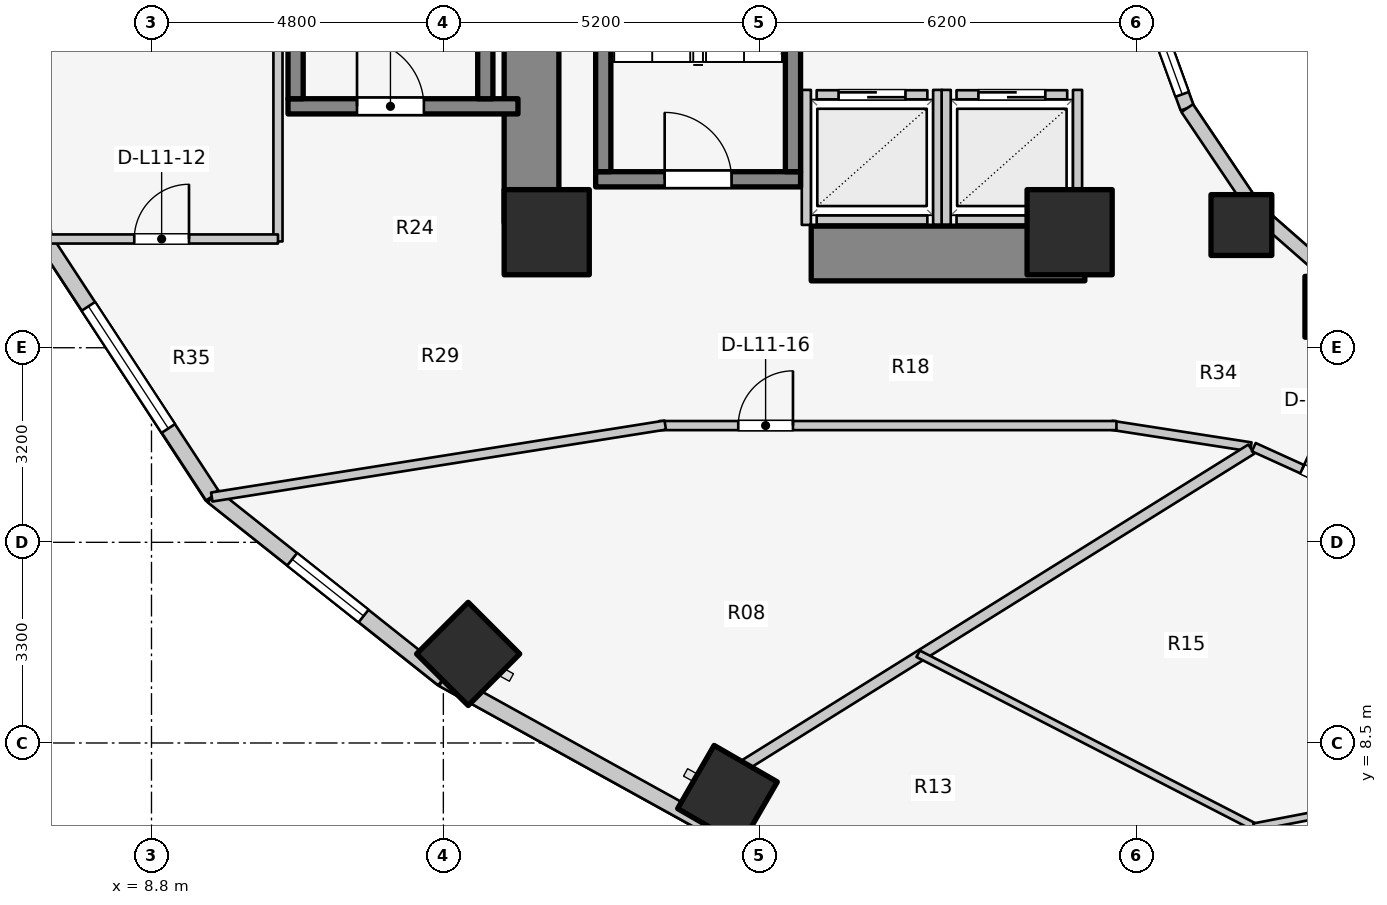
"""IFC4 building model, lengths in metres.
Left out: names, types, materials, properties, quantities, classifications, styles, units other than length and angle.
Written with IfcOpenShell. Run it as: python <this file> out.ifc"""

import sys

from ifc_helpers import new_model, si_unit, direction, frame, frame_2d, origin, origin_2d, place, context, subcontext, project, spatial, rectangle, extrude, element, fill, save


model = new_model("IFC4")
c1 = context("Model", 3, precision=1e-05, world=origin(), true_north=direction((0.0, 1.0)))
c2 = subcontext(c1, "Body", "Model", "MODEL_VIEW")
j1 = project(units=[si_unit("LENGTHUNIT", "METRE"), si_unit("PLANEANGLEUNIT", "RADIAN")], contexts=[c1])
p1 = place(None, origin())
s1 = spatial("IfcSite", under=j1, at=p1, CompositionType="ELEMENT")
p2 = place(p1, origin())
s2 = spatial("IfcBuilding", under=s1, at=p2, CompositionType="ELEMENT")
p3 = place(p2, frame((0.0, 0.0, 40.0)))
s3 = spatial("IfcBuildingStorey", under=s2, at=p3, CompositionType="ELEMENT", Elevation=40.0)
p4 = place(p3, frame((15.05, 17.05, 0.0), z_axis=(0.0, 0.0, 1.0), x_axis=(0.0, 1.0, 0.0)))
e1 = element("IfcWall", 1, at=p4, inside=s3, PredefinedType="SHEAR", context=c2, shape_type="SweptSolid", body=[
    extrude(rectangle(XDim=12.8, YDim=0.9, at=frame_2d((6.4, 0.0))), origin(), (0.0, 0.0, 1.0), 3.1),
])
p5 = place(p3, frame((19.65, 16.55, 0.0), z_axis=(0.0, 0.0, 1.0), x_axis=(1.0, 0.0, 0.0)))
e2 = element("IfcWall", 2, at=p5, inside=s3, PredefinedType="SHEAR", context=c2, shape_type="SweptSolid", body=[
    extrude(rectangle(XDim=4.5, YDim=0.9, at=frame_2d((2.25, 0.0))), origin(), (0.0, 0.0, 1.0), 3.1),
])
p6 = place(p3, frame((16.105, 17.77, 0.0), z_axis=(0.0, 0.0, 1.0), x_axis=(1.0, 0.0, 0.0)))
e3 = element("IfcWall", 3, at=p6, inside=s3, PredefinedType="SOLIDWALL", context=c2, shape_type="SweptSolid", body=[
    extrude(rectangle(XDim=3.37, YDim=0.25, at=frame_2d((1.685, 0.0))), origin(), (0.0, 0.0, 1.0), 3.1),
])
p7 = place(p6, frame((1.135, 0.0, 0.0)))
e4 = element("IfcOpeningElement", 4, at=p7, cuts=e3, PredefinedType="OPENING", context=c2, shape_type="SweptSolid", body=[
    extrude(rectangle(XDim=1.1, YDim=2.1, at=frame_2d((0.55, 1.05))), frame((0.0, 0.135, 0.0), z_axis=(0.0, -1.0, 0.0), x_axis=(1.0, 0.0, 0.0)), (0.0, 0.0, 1.0), 0.27),
])
for number, where, z_axis, x_axis in (
    (5, (16.23, 17.895, 0.0), (0.0, 0.0, 1.0), (0.0, 1.0, 0.0)),
    (6, (19.35, 17.895, 0.0), (0.0, 0.0, 1.0), (0.0, 1.0, 0.0)),
):
    element("IfcWall", number, at=place(p3, frame(where, z_axis=z_axis, x_axis=x_axis)), inside=s3, PredefinedType="SOLIDWALL", context=c2, shape_type="SweptSolid", body=[
        extrude(rectangle(XDim=7.81, YDim=0.25, at=frame_2d((3.905, 0.0))), origin(), (0.0, 0.0, 1.0), 3.1),
    ])
p8 = place(p3, frame((11.045, 18.97, 0.0), z_axis=(0.0, 0.0, 1.0), x_axis=(1.0, 0.0, 0.0)))
e7 = element("IfcWall", 7, at=p8, inside=s3, PredefinedType="SOLIDWALL", context=c2, shape_type="SweptSolid", body=[
    extrude(rectangle(XDim=3.782, YDim=0.25, at=frame_2d((1.891, 0.0))), origin(), (0.0, 0.0, 1.0), 3.1),
])
p9 = place(p8, frame((1.135, 0.0, 0.0)))
e8 = element("IfcOpeningElement", 8, at=p9, cuts=e7, PredefinedType="OPENING", context=c2, shape_type="SweptSolid", body=[
    extrude(rectangle(XDim=1.1, YDim=2.1, at=frame_2d((0.55, 1.05))), frame((0.0, 0.135, 0.0), z_axis=(0.0, -1.0, 0.0), x_axis=(1.0, 0.0, 0.0)), (0.0, 0.0, 1.0), 0.27),
])
for number, where, z_axis, x_axis in (
    (9, (11.17, 19.095, 0.0), (0.0, 0.0, 1.0), (0.0, 1.0, 0.0)),
    (10, (14.29, 19.095, 0.0), (0.0, 0.0, 1.0), (0.0, 1.0, 0.0)),
):
    element("IfcWall", number, at=place(p3, frame(where, z_axis=z_axis, x_axis=x_axis)), inside=s3, PredefinedType="SOLIDWALL", context=c2, shape_type="SweptSolid", body=[
        extrude(rectangle(XDim=7.81, YDim=0.25, at=frame_2d((3.905, 0.0))), origin(), (0.0, 0.0, 1.0), 3.1),
    ])
for number, where, z_axis, x_axis in (
    (11, (15.3, 16.9, 0.0), (0.0, 0.0, 1.0), (1.0, 0.0, 0.0)),
    (12, (23.9, 16.9, 0.0), (0.0, 0.0, 1.0), (1.0, 0.0, 0.0)),
):
    element("IfcColumn", number, at=place(p3, frame(where, z_axis=z_axis, x_axis=x_axis)), inside=s3, PredefinedType="COLUMN", context=c2, shape_type="SweptSolid", body=[
        extrude(rectangle(XDim=1.4, YDim=1.4, at=origin_2d()), origin(), (0.0, 0.0, 1.0), 3.1),
    ])
p10 = place(p3, frame((26.725, 17.018, 0.0), z_axis=(0.0, 0.0, 1.0), x_axis=(1.0, 0.0, 0.0)))
e13 = element("IfcColumn", 13, at=p10, inside=s3, PredefinedType="COLUMN", context=c2, shape_type="SweptSolid", body=[
    extrude(rectangle(XDim=1.0, YDim=1.0, at=origin_2d()), origin(), (0.0, 0.0, 1.0), 3.1),
])
p11 = place(p3, frame((14.008, 9.965, 0.0), z_axis=(0.0, 0.0, 1.0), x_axis=(-0.707106781187, -0.707106781187, 0.0)))
e14 = element("IfcColumn", 14, at=p11, inside=s3, PredefinedType="COLUMN", context=c2, shape_type="SweptSolid", body=[
    extrude(rectangle(XDim=1.2, YDim=1.2, at=origin_2d()), origin(), (0.0, 0.0, 1.0), 3.1),
])
p12 = place(p3, frame((28.27, 15.673, 0.0), z_axis=(0.0, 0.0, 1.0), x_axis=(1.0, 0.0, 0.0)))
e15 = element("IfcColumn", 15, at=p12, inside=s3, PredefinedType="COLUMN", context=c2, shape_type="SweptSolid", body=[
    extrude(rectangle(XDim=1.0, YDim=1.0, at=origin_2d()), origin(), (0.0, 0.0, 1.0), 3.1),
])
p13 = place(p3, frame((18.273, 7.641, 0.0), z_axis=(0.0, 0.0, 1.0), x_axis=(-0.5, -0.866025403784, 0.0)))
e16 = element("IfcColumn", 16, at=p13, inside=s3, PredefinedType="COLUMN", context=c2, shape_type="SweptSolid", body=[
    extrude(rectangle(XDim=1.2, YDim=1.2, at=origin_2d()), origin(), (0.0, 0.0, 1.0), 3.1),
])
p14 = place(p3, frame((25.123, 20.898, 0.0), z_axis=(0.0, 0.0, 1.0), x_axis=(0.341423187295, -0.93990968033, 0.0)))
e17 = element("IfcWall", 17, at=p14, inside=s3, PredefinedType="STANDARD", context=c2, shape_type="SweptSolid", body=[
    extrude(rectangle(XDim=2.084, YDim=0.23, at=frame_2d((1.042, 0.0))), origin(), (0.0, 0.0, 1.0), 2.84),
])
p15 = place(p14, frame((0.242, 0.0, 0.85)))
e18 = element("IfcOpeningElement", 18, at=p15, cuts=e17, PredefinedType="OPENING", context=c2, shape_type="SweptSolid", body=[
    extrude(rectangle(XDim=1.6, YDim=1.65, at=frame_2d((0.8, 0.825))), frame((0.0, 0.125, 0.0), z_axis=(0.0, -1.0, 0.0), x_axis=(1.0, 0.0, 0.0)), (0.0, 0.0, 1.0), 0.25),
])
p16 = place(p3, frame((25.834, 18.94, 0.0), z_axis=(0.0, 0.0, 1.0), x_axis=(0.558197800898, -0.829707909492, 0.0)))
e19 = element("IfcWall", 19, at=p16, inside=s3, PredefinedType="STANDARD", context=c2, shape_type="SweptSolid", body=[
    extrude(rectangle(XDim=2.027, YDim=0.23, at=frame_2d((1.013, 0.0))), origin(), (0.0, 0.0, 1.0), 2.16),
])
p17 = place(p3, frame((26.965, 17.258, 0.0), z_axis=(0.0, 0.0, 1.0), x_axis=(0.752576694707, -0.658504607869, 0.0)))
e20 = element("IfcWall", 20, at=p17, inside=s3, PredefinedType="STANDARD", context=c2, shape_type="SweptSolid", body=[
    extrude(rectangle(XDim=1.959, YDim=0.23, at=frame_2d((0.98, 0.0))), origin(), (0.0, 0.0, 1.0), 2.16),
])
p18 = place(p3, frame((7.033, 16.795, 0.0), z_axis=(0.0, 0.0, 1.0), x_axis=(0.547702757047, -0.836672988642, 0.0)))
e21 = element("IfcWall", 21, at=p18, inside=s3, PredefinedType="STANDARD", context=c2, shape_type="SweptSolid", body=[
    extrude(rectangle(XDim=5.062, YDim=0.26, at=frame_2d((2.531, 0.0))), origin(), (0.0, 0.0, 1.0), 2.85),
])
p19 = place(p18, frame((1.331, 0.0, 0.75)))
e22 = element("IfcOpeningElement", 22, at=p19, cuts=e21, PredefinedType="OPENING", context=c2, shape_type="SweptSolid", body=[
    extrude(rectangle(XDim=2.4, YDim=1.7, at=frame_2d((1.2, 0.85))), frame((0.0, 0.14, 0.0), z_axis=(0.0, -1.0, 0.0), x_axis=(1.0, 0.0, 0.0)), (0.0, 0.0, 1.0), 0.28),
])
p20 = place(p3, frame((9.806, 12.559, 0.0), z_axis=(0.0, 0.0, 1.0), x_axis=(0.783123133379, -0.621866672179, 0.0)))
e23 = element("IfcWall", 23, at=p20, inside=s3, PredefinedType="STANDARD", context=c2, shape_type="SweptSolid", body=[
    extrude(rectangle(XDim=4.839, YDim=0.26, at=frame_2d((2.419, 0.0))), origin(), (0.0, 0.0, 1.0), 2.85),
])
p21 = place(p20, frame((1.669, 0.0, 0.75)))
e24 = element("IfcOpeningElement", 24, at=p21, cuts=e23, PredefinedType="OPENING", context=c2, shape_type="SweptSolid", body=[
    extrude(rectangle(XDim=1.5, YDim=1.6, at=frame_2d((0.75, 0.8))), frame((0.0, 0.14, 0.0), z_axis=(0.0, -1.0, 0.0), x_axis=(1.0, 0.0, 0.0)), (0.0, 0.0, 1.0), 0.28),
])
p22 = place(p3, frame((13.595, 9.55, 0.0), z_axis=(0.0, 0.0, 1.0), x_axis=(0.875137303239, -0.483874674352, 0.0)))
e25 = element("IfcWall", 25, at=p22, inside=s3, PredefinedType="STANDARD", context=c2, shape_type="SweptSolid", body=[
    extrude(rectangle(XDim=4.985, YDim=0.26, at=frame_2d((2.493, 0.0))), origin(), (0.0, 0.0, 1.0), 2.85),
])
p23 = place(p3, frame((17.958, 7.138, 0.0), z_axis=(0.0, 0.0, 1.0), x_axis=(0.958843593522, -0.283934786811, 0.0)))
e26 = element("IfcWall", 26, at=p23, inside=s3, PredefinedType="STANDARD", context=c2, shape_type="SweptSolid", body=[
    extrude(rectangle(XDim=5.955, YDim=0.26, at=frame_2d((2.978, 0.0))), origin(), (0.0, 0.0, 1.0), 2.85),
])
p24 = place(p23, frame((1.778, 0.0, 0.75)))
e27 = element("IfcOpeningElement", 27, at=p24, cuts=e26, PredefinedType="OPENING", context=c2, shape_type="SweptSolid", body=[
    extrude(rectangle(XDim=2.4, YDim=1.7, at=frame_2d((1.2, 0.85))), frame((0.0, 0.14, 0.0), z_axis=(0.0, -1.0, 0.0), x_axis=(1.0, 0.0, 0.0)), (0.0, 0.0, 1.0), 0.28),
])
p25 = place(p3, frame((19.74, 19.16, 0.0), z_axis=(0.0, 0.0, 1.0), x_axis=(1.0, 0.0, 0.0)))
e28 = element("IfcWall", 28, at=p25, inside=s3, PredefinedType="SOLIDWALL", context=c2, shape_type="SweptSolid", body=[
    extrude(rectangle(XDim=1.82, YDim=0.15, at=frame_2d((0.91, 0.0))), origin(), (0.0, 0.0, 1.0), 2.855),
])
p26 = place(p25, frame((0.36, 0.0, 0.0)))
e29 = element("IfcOpeningElement", 29, at=p26, cuts=e28, PredefinedType="OPENING", context=c2, shape_type="SweptSolid", body=[
    extrude(rectangle(XDim=1.1, YDim=2.1, at=frame_2d((0.55, 1.05))), frame((0.0, 0.085, 0.0), z_axis=(0.0, -1.0, 0.0), x_axis=(1.0, 0.0, 0.0)), (0.0, 0.0, 1.0), 0.17),
])
p27 = place(p3, frame((19.74, 17.1, 0.0), z_axis=(0.0, 0.0, 1.0), x_axis=(1.0, 0.0, 0.0)))
e30 = element("IfcWall", 30, at=p27, inside=s3, PredefinedType="SOLIDWALL", context=c2, shape_type="SweptSolid", body=[
    extrude(rectangle(XDim=1.82, YDim=0.15, at=frame_2d((0.91, 0.0))), origin(), (0.0, 0.0, 1.0), 2.855),
])
p28 = place(p3, frame((19.57, 17.02, 0.0), z_axis=(0.0, 0.0, 1.0), x_axis=(0.0, 1.0, 0.0)))
e31 = element("IfcWall", 31, at=p28, inside=s3, PredefinedType="SOLIDWALL", context=c2, shape_type="SweptSolid", body=[
    extrude(rectangle(XDim=2.22, YDim=0.15, at=frame_2d((1.11, 0.0))), origin(), (0.0, 0.0, 1.0), 2.12),
])
p29 = place(p3, frame((21.73, 17.02, 0.0), z_axis=(0.0, 0.0, 1.0), x_axis=(0.0, 1.0, 0.0)))
e32 = element("IfcWall", 32, at=p29, inside=s3, PredefinedType="SOLIDWALL", context=c2, shape_type="SweptSolid", body=[
    extrude(rectangle(XDim=2.22, YDim=0.15, at=frame_2d((1.11, 0.0))), origin(), (0.0, 0.0, 1.0), 2.855),
])
p30 = place(p3, frame((22.04, 19.16, 0.0), z_axis=(0.0, 0.0, 1.0), x_axis=(1.0, 0.0, 0.0)))
e33 = element("IfcWall", 33, at=p30, inside=s3, PredefinedType="SOLIDWALL", context=c2, shape_type="SweptSolid", body=[
    extrude(rectangle(XDim=1.82, YDim=0.15, at=frame_2d((0.91, 0.0))), origin(), (0.0, 0.0, 1.0), 2.12),
])
p31 = place(p30, frame((0.36, 0.0, 0.0)))
e34 = element("IfcOpeningElement", 34, at=p31, cuts=e33, PredefinedType="OPENING", context=c2, shape_type="SweptSolid", body=[
    extrude(rectangle(XDim=1.1, YDim=2.1, at=frame_2d((0.55, 1.05))), frame((0.0, 0.085, 0.0), z_axis=(0.0, -1.0, 0.0), x_axis=(1.0, 0.0, 0.0)), (0.0, 0.0, 1.0), 0.17),
])
p32 = place(p3, frame((22.04, 17.1, 0.0), z_axis=(0.0, 0.0, 1.0), x_axis=(1.0, 0.0, 0.0)))
e35 = element("IfcWall", 35, at=p32, inside=s3, PredefinedType="SOLIDWALL", context=c2, shape_type="SweptSolid", body=[
    extrude(rectangle(XDim=1.82, YDim=0.15, at=frame_2d((0.91, 0.0))), origin(), (0.0, 0.0, 1.0), 2.12),
])
p33 = place(p3, frame((21.87, 17.02, 0.0), z_axis=(0.0, 0.0, 1.0), x_axis=(0.0, 1.0, 0.0)))
e36 = element("IfcWall", 36, at=p33, inside=s3, PredefinedType="SOLIDWALL", context=c2, shape_type="SweptSolid", body=[
    extrude(rectangle(XDim=2.22, YDim=0.15, at=frame_2d((1.11, 0.0))), origin(), (0.0, 0.0, 1.0), 2.855),
])
p34 = place(p3, frame((24.03, 17.02, 0.0), z_axis=(0.0, 0.0, 1.0), x_axis=(0.0, 1.0, 0.0)))
e37 = element("IfcWall", 37, at=p34, inside=s3, PredefinedType="SOLIDWALL", context=c2, shape_type="SweptSolid", body=[
    extrude(rectangle(XDim=2.22, YDim=0.15, at=frame_2d((1.11, 0.0))), origin(), (0.0, 0.0, 1.0), 2.12),
])
p35 = place(p3, frame((10.88, 16.748, 0.0), z_axis=(0.0, 0.0, 1.0), x_axis=(0.0, 1.0, 0.0)))
e38 = element("IfcWall", 38, at=p35, inside=s3, PredefinedType="PARTITIONING", context=c2, shape_type="SweptSolid", body=[
    extrude(rectangle(XDim=12.503, YDim=0.15, at=frame_2d((6.252, 0.0))), origin(), (0.0, 0.0, 1.0), 2.12),
])
p36 = place(p3, frame((7.014, 16.788, 0.0), z_axis=(0.0, 0.0, 1.0), x_axis=(1.0, 0.0, 0.0)))
e39 = element("IfcWall", 39, at=p36, inside=s3, PredefinedType="PARTITIONING", context=c2, shape_type="SweptSolid", body=[
    extrude(rectangle(XDim=3.866, YDim=0.15, at=frame_2d((1.933, 0.0))), origin(), (0.0, 0.0, 1.0), 2.855),
])
p37 = place(p36, frame((1.503, 0.0, 0.0)))
e40 = element("IfcOpeningElement", 40, at=p37, cuts=e39, PredefinedType="OPENING", context=c2, shape_type="SweptSolid", body=[
    extrude(rectangle(XDim=0.9, YDim=2.1, at=frame_2d((0.45, 1.05))), frame((0.0, 0.085, 0.0), z_axis=(0.0, -1.0, 0.0), x_axis=(1.0, 0.0, 0.0)), (0.0, 0.0, 1.0), 0.17),
])
p38 = place(p3, frame((26.881, 13.369, 0.0), z_axis=(0.0, 0.0, 1.0), x_axis=(-0.988184633586, 0.153268163508, 0.0)))
e41 = element("IfcWall", 41, at=p38, inside=s3, PredefinedType="PARTITIONING", context=c2, shape_type="SweptSolid", body=[
    extrude(rectangle(XDim=2.318, YDim=0.15, at=frame_2d((1.159, 0.0))), origin(), (0.0, 0.0, 1.0), 2.237),
])
p39 = place(p3, frame((17.15, 13.72, 0.0), z_axis=(0.0, 0.0, 1.0), x_axis=(1.0, 0.0, 0.0)))
e42 = element("IfcWall", 42, at=p39, inside=s3, PredefinedType="PARTITIONING", context=c2, shape_type="SweptSolid", body=[
    extrude(rectangle(XDim=7.52, YDim=0.15, at=frame_2d((3.76, 0.0))), origin(), (0.0, 0.0, 1.0), 2.237),
])
p40 = place(p39, frame((1.3, 0.0, 0.0)))
e43 = element("IfcOpeningElement", 43, at=p40, cuts=e42, PredefinedType="OPENING", context=c2, shape_type="SweptSolid", body=[
    extrude(rectangle(XDim=0.9, YDim=2.1, at=frame_2d((0.45, 1.05))), frame((0.0, 0.085, 0.0), z_axis=(0.0, -1.0, 0.0), x_axis=(1.0, 0.0, 0.0)), (0.0, 0.0, 1.0), 0.17),
])
p41 = place(p3, frame((17.25, 13.728, 0.0), z_axis=(0.0, 0.0, 1.0), x_axis=(-0.987655781226, -0.156639898525, 0.0)))
e44 = element("IfcWall", 44, at=p41, inside=s3, PredefinedType="PARTITIONING", context=c2, shape_type="SweptSolid", body=[
    extrude(rectangle(XDim=7.552, YDim=0.15, at=frame_2d((3.776, 0.0))), origin(), (0.0, 0.0, 1.0), 2.069),
])
p42 = place(p3, frame((26.888, 13.332, 0.0), z_axis=(0.0, 0.0, 1.0), x_axis=(-0.848647785721, -0.52895834977, 0.0)))
e45 = element("IfcWall", 45, at=p42, inside=s3, PredefinedType="PARTITIONING", context=c2, shape_type="SweptSolid", body=[
    extrude(rectangle(XDim=9.81, YDim=0.18, at=frame_2d((4.905, 0.0))), origin(), (0.0, 0.0, 1.0), 2.237),
])
p43 = place(p3, frame((21.409, 9.967, 0.0), z_axis=(0.0, 0.0, 1.0), x_axis=(0.889172609005, -0.457571930296, 0.0)))
e46 = element("IfcWall", 46, at=p43, inside=s3, PredefinedType="MOVABLE", context=c2, shape_type="SweptSolid", body=[
    extrude(rectangle(XDim=6.232, YDim=0.12, at=frame_2d((3.116, 0.0))), origin(), (0.0, 0.0, 1.0), 2.237),
])
p44 = place(p3, frame((26.932, 7.118, 0.0), z_axis=(0.0, 0.0, 1.0), x_axis=(0.982039182538, 0.188677089126, 0.0)))
e47 = element("IfcWall", 47, at=p44, inside=s3, PredefinedType="MOVABLE", context=c2, shape_type="SweptSolid", body=[
    extrude(rectangle(XDim=5.211, YDim=0.12, at=frame_2d((2.605, 0.0))), origin(), (0.0, 0.0, 1.0), 2.237),
])
p45 = place(p44, frame((2.131, 0.0, 0.0)))
e48 = element("IfcOpeningElement", 48, at=p45, cuts=e47, PredefinedType="OPENING", context=c2, shape_type="SweptSolid", body=[
    extrude(rectangle(XDim=0.95, YDim=2.1, at=frame_2d((0.475, 1.05))), frame((0.0, 0.07, 0.0), z_axis=(0.0, -1.0, 0.0), x_axis=(1.0, 0.0, 0.0)), (0.0, 0.0, 1.0), 0.14),
])
p46 = place(p3, frame((26.929, 13.365, 0.0), z_axis=(0.0, 0.0, 1.0), x_axis=(0.910186679378, -0.414198272186, 0.0)))
e49 = element("IfcWall", 49, at=p46, inside=s3, PredefinedType="PARTITIONING", context=c2, shape_type="SweptSolid", body=[
    extrude(rectangle(XDim=2.698, YDim=0.15, at=frame_2d((1.349, 0.0))), origin(), (0.0, 0.0, 1.0), 2.237),
])
p47 = place(p46, frame((0.874, 0.0, 0.0)))
e50 = element("IfcOpeningElement", 50, at=p47, cuts=e49, PredefinedType="OPENING", context=c2, shape_type="SweptSolid", body=[
    extrude(rectangle(XDim=0.95, YDim=2.1, at=frame_2d((0.475, 1.05))), frame((0.0, 0.085, 0.0), z_axis=(0.0, -1.0, 0.0), x_axis=(1.0, 0.0, 0.0)), (0.0, 0.0, 1.0), 0.17),
])
p48 = place(p15, origin())
e51 = element("IfcWindow", 51, at=p48, inside=s3, PartitioningType="SINGLE_PANEL", PredefinedType="WINDOW", context=c2, shape_type="SweptSolid", body=[
    extrude(rectangle(XDim=1.6, YDim=1.65, at=frame_2d((0.8, 0.825))), frame((0.0, 0.03, 0.0), z_axis=(0.0, -1.0, 0.0), x_axis=(1.0, 0.0, 0.0)), (0.0, 0.0, 1.0), 0.06),
])
fill(e18, e51)
p49 = place(p19, origin())
e52 = element("IfcWindow", 52, at=p49, inside=s3, PartitioningType="SINGLE_PANEL", PredefinedType="WINDOW", context=c2, shape_type="SweptSolid", body=[
    extrude(rectangle(XDim=2.4, YDim=1.7, at=frame_2d((1.2, 0.85))), frame((0.0, 0.03, 0.0), z_axis=(0.0, -1.0, 0.0), x_axis=(1.0, 0.0, 0.0)), (0.0, 0.0, 1.0), 0.06),
])
fill(e22, e52)
p50 = place(p21, origin())
e53 = element("IfcWindow", 53, at=p50, inside=s3, PartitioningType="SINGLE_PANEL", PredefinedType="WINDOW", context=c2, shape_type="SweptSolid", body=[
    extrude(rectangle(XDim=1.5, YDim=1.6, at=frame_2d((0.75, 0.8))), frame((0.0, 0.03, 0.0), z_axis=(0.0, -1.0, 0.0), x_axis=(1.0, 0.0, 0.0)), (0.0, 0.0, 1.0), 0.06),
])
fill(e24, e53)
p51 = place(p7, origin())
e54 = element("IfcDoor", 54, at=p51, inside=s3, OperationType="SINGLE_SWING_LEFT", PredefinedType="DOOR", context=c2, shape_type="SweptSolid", body=[
    extrude(rectangle(XDim=1.1, YDim=2.1, at=frame_2d((0.55, 1.05))), frame((0.0, 0.025, 0.0), z_axis=(0.0, -1.0, 0.0), x_axis=(1.0, 0.0, 0.0)), (0.0, 0.0, 1.0), 0.05),
])
fill(e4, e54)
p52 = place(p9, origin())
e55 = element("IfcDoor", 55, at=p52, inside=s3, OperationType="SINGLE_SWING_LEFT", PredefinedType="DOOR", context=c2, shape_type="SweptSolid", body=[
    extrude(rectangle(XDim=1.1, YDim=2.1, at=frame_2d((0.55, 1.05))), frame((0.0, 0.025, 0.0), z_axis=(0.0, -1.0, 0.0), x_axis=(1.0, 0.0, 0.0)), (0.0, 0.0, 1.0), 0.05),
])
fill(e8, e55)
p53 = place(p26, origin())
e56 = element("IfcDoor", 56, at=p53, inside=s3, OperationType="DOUBLE_DOOR_SLIDING", PredefinedType="DOOR", context=c2, shape_type="SweptSolid", body=[
    extrude(rectangle(XDim=1.1, YDim=2.1, at=frame_2d((0.55, 1.05))), frame((0.0, 0.025, 0.0), z_axis=(0.0, -1.0, 0.0), x_axis=(1.0, 0.0, 0.0)), (0.0, 0.0, 1.0), 0.05),
])
fill(e29, e56)
p54 = place(p31, origin())
e57 = element("IfcDoor", 57, at=p54, inside=s3, OperationType="DOUBLE_DOOR_SLIDING", PredefinedType="DOOR", context=c2, shape_type="SweptSolid", body=[
    extrude(rectangle(XDim=1.1, YDim=2.1, at=frame_2d((0.55, 1.05))), frame((0.0, 0.025, 0.0), z_axis=(0.0, -1.0, 0.0), x_axis=(1.0, 0.0, 0.0)), (0.0, 0.0, 1.0), 0.05),
])
fill(e34, e57)
p55 = place(p37, origin())
e58 = element("IfcDoor", 58, at=p55, inside=s3, OperationType="SINGLE_SWING_RIGHT", PredefinedType="DOOR", context=c2, shape_type="SweptSolid", body=[
    extrude(rectangle(XDim=0.9, YDim=2.1, at=frame_2d((0.45, 1.05))), frame((0.0, 0.025, 0.0), z_axis=(0.0, -1.0, 0.0), x_axis=(1.0, 0.0, 0.0)), (0.0, 0.0, 1.0), 0.05),
])
fill(e40, e58)
p56 = place(p40, origin())
e59 = element("IfcDoor", 59, at=p56, inside=s3, OperationType="SINGLE_SWING_RIGHT", PredefinedType="DOOR", context=c2, shape_type="SweptSolid", body=[
    extrude(rectangle(XDim=0.9, YDim=2.1, at=frame_2d((0.45, 1.05))), frame((0.0, 0.025, 0.0), z_axis=(0.0, -1.0, 0.0), x_axis=(1.0, 0.0, 0.0)), (0.0, 0.0, 1.0), 0.05),
])
fill(e43, e59)
p57 = place(p47, origin())
e60 = element("IfcDoor", 60, at=p57, inside=s3, OperationType="SINGLE_SWING_LEFT", PredefinedType="DOOR", context=c2, shape_type="SweptSolid", body=[
    extrude(rectangle(XDim=0.95, YDim=2.1, at=frame_2d((0.475, 1.05))), frame((0.0, 0.025, 0.0), z_axis=(0.0, -1.0, 0.0), x_axis=(1.0, 0.0, 0.0)), (0.0, 0.0, 1.0), 0.05),
])
fill(e50, e60)
save(model, sys.argv[1])
